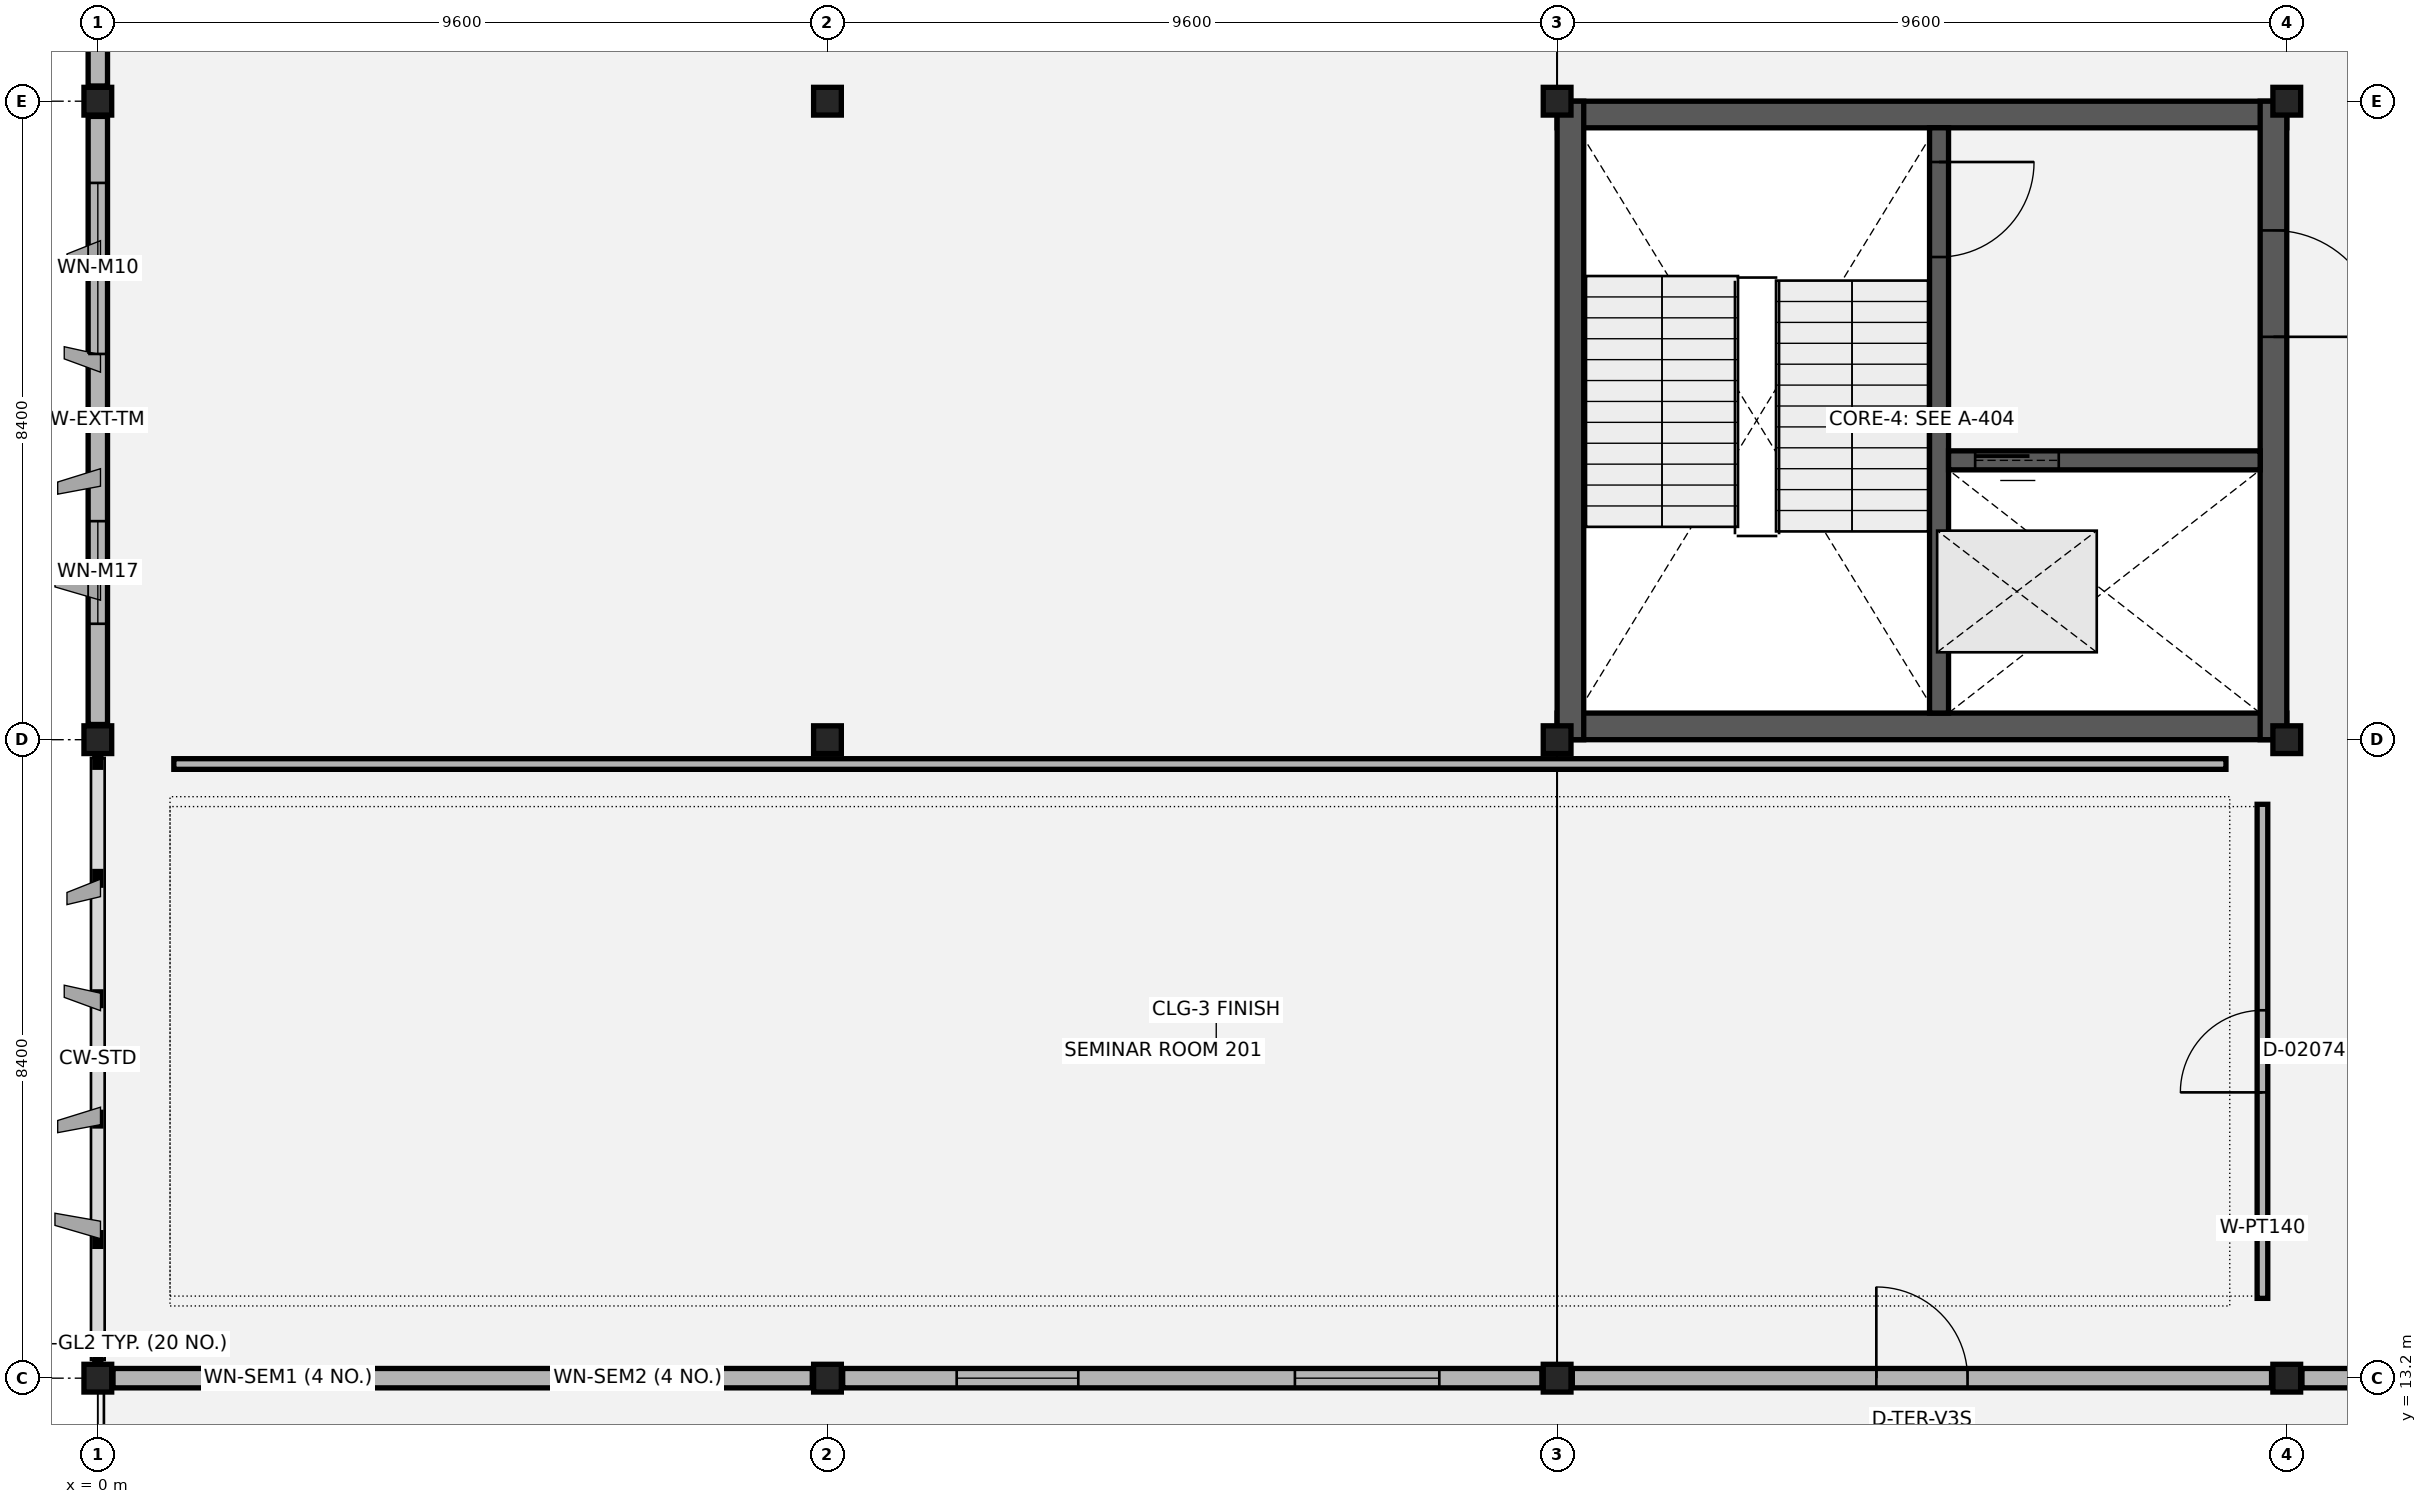
"""IFC4 building model, lengths in metres.
Left out: names, types, materials, properties, quantities, classifications, styles, units other than length and angle.
Written with IfcOpenShell. Run it as: python <this file> out.ifc"""

import sys

from ifc_helpers import new_model, si_unit, direction, frame, frame_2d, origin, origin_2d, place, context, subcontext, project, spatial, rectangle, extrude, element, fill, save


model = new_model("IFC4")
c1 = context("Model", 3, precision=1e-05, world=origin(), true_north=direction((0.0, 1.0)))
c2 = subcontext(c1, "Body", "Model", "MODEL_VIEW")
j1 = project(units=[si_unit("LENGTHUNIT", "METRE"), si_unit("PLANEANGLEUNIT", "RADIAN")], contexts=[c1])
p1 = place(None, origin())
s1 = spatial("IfcSite", under=j1, at=p1, CompositionType="ELEMENT")
p2 = place(p1, origin())
s2 = spatial("IfcBuilding", under=s1, at=p2, CompositionType="ELEMENT")
p3 = place(p2, frame((0.0, 0.0, 10.2)))
s3 = spatial("IfcBuildingStorey", under=s2, at=p3, CompositionType="ELEMENT", Elevation=10.2)
for number, where, z_axis, x_axis in (
    (1, (0.0, 13.2, 0.0), (0.0, 0.0, 1.0), (1.0, 0.0, 0.0)),
    (2, (0.0, 21.6, 0.0), (0.0, 0.0, 1.0), (1.0, 0.0, 0.0)),
    (3, (0.0, 30.0, 0.0), (0.0, 0.0, 1.0), (1.0, 0.0, 0.0)),
    (4, (9.6, 13.2, 0.0), (0.0, 0.0, 1.0), (1.0, 0.0, 0.0)),
    (5, (9.6, 21.6, 0.0), (0.0, 0.0, 1.0), (1.0, 0.0, 0.0)),
    (6, (9.6, 30.0, 0.0), (0.0, 0.0, 1.0), (1.0, 0.0, 0.0)),
    (7, (19.2, 13.2, 0.0), (0.0, 0.0, 1.0), (1.0, 0.0, 0.0)),
    (8, (19.2, 21.6, 0.0), (0.0, 0.0, 1.0), (1.0, 0.0, 0.0)),
    (9, (19.2, 30.0, 0.0), (0.0, 0.0, 1.0), (1.0, 0.0, 0.0)),
    (10, (28.8, 13.2, 0.0), (0.0, 0.0, 1.0), (1.0, 0.0, 0.0)),
    (11, (28.8, 21.6, 0.0), (0.0, 0.0, 1.0), (1.0, 0.0, 0.0)),
    (12, (28.8, 30.0, 0.0), (0.0, 0.0, 1.0), (1.0, 0.0, 0.0)),
):
    element("IfcColumn", number, at=place(p3, frame(where, z_axis=z_axis, x_axis=x_axis)), inside=s3, PredefinedType="COLUMN", context=c2, shape_type="SweptSolid", body=[
        extrude(rectangle(XDim=0.365, YDim=0.365, at=origin_2d()), origin(), (0.0, 0.0, 1.0), 4.2),
    ])
p4 = place(p3, frame((0.0, 29.8, 0.0), z_axis=(0.0, 0.0, 1.0), x_axis=(0.0, -1.0, 0.0)))
e13 = element("IfcWall", 13, at=p4, inside=s3, PredefinedType="SOLIDWALL", context=c2, shape_type="SweptSolid", body=[
    extrude(rectangle(XDim=8.0, YDim=0.255, at=frame_2d((4.0, 0.0))), origin(), (0.0, 0.0, 1.0), 3.05),
])
p5 = place(p4, frame((0.875, 0.0, 0.9)))
e14 = element("IfcOpeningElement", 14, at=p5, cuts=e13, PredefinedType="OPENING", context=c2, shape_type="SweptSolid", body=[
    extrude(rectangle(XDim=2.25, YDim=1.65, at=frame_2d((1.125, 0.825))), frame((0.0, 0.137, 0.0), z_axis=(0.0, -1.0, 0.0), x_axis=(1.0, 0.0, 0.0)), (0.0, 0.0, 1.0), 0.275),
])
p6 = place(p4, frame((5.325, 0.0, 0.9)))
e15 = element("IfcOpeningElement", 15, at=p6, cuts=e13, PredefinedType="OPENING", context=c2, shape_type="SweptSolid", body=[
    extrude(rectangle(XDim=1.35, YDim=1.35, at=frame_2d((0.675, 0.675))), frame((0.0, 0.137, 0.0), z_axis=(0.0, -1.0, 0.0), x_axis=(1.0, 0.0, 0.0)), (0.0, 0.0, 1.0), 0.275),
])
p7 = place(p3, frame((0.0, 38.2, 0.0), z_axis=(0.0, 0.0, 1.0), x_axis=(0.0, -1.0, 0.0)))
e16 = element("IfcWall", 16, at=p7, inside=s3, PredefinedType="SOLIDWALL", context=c2, shape_type="SweptSolid", body=[
    extrude(rectangle(XDim=8.0, YDim=0.255, at=frame_2d((4.0, 0.0))), origin(), (0.0, 0.0, 1.0), 3.05),
])
p8 = place(p7, frame((0.725, 0.0, 0.9)))
e17 = element("IfcOpeningElement", 17, at=p8, cuts=e16, PredefinedType="OPENING", context=c2, shape_type="SweptSolid", body=[
    extrude(rectangle(XDim=2.55, YDim=1.75, at=frame_2d((1.275, 0.875))), frame((0.0, 0.137, 0.0), z_axis=(0.0, -1.0, 0.0), x_axis=(1.0, 0.0, 0.0)), (0.0, 0.0, 1.0), 0.275),
])
p9 = place(p7, frame((5.0, 0.0, 0.9)))
e18 = element("IfcOpeningElement", 18, at=p9, cuts=e16, PredefinedType="OPENING", context=c2, shape_type="SweptSolid", body=[
    extrude(rectangle(XDim=2.0, YDim=1.55, at=frame_2d((1.0, 0.775))), frame((0.0, 0.137, 0.0), z_axis=(0.0, -1.0, 0.0), x_axis=(1.0, 0.0, 0.0)), (0.0, 0.0, 1.0), 0.275),
])
p10 = place(p3, frame((0.2, 13.2, 0.0), z_axis=(0.0, 0.0, 1.0), x_axis=(1.0, 0.0, 0.0)))
e19 = element("IfcWall", 19, at=p10, inside=s3, PredefinedType="SOLIDWALL", context=c2, shape_type="SweptSolid", body=[
    extrude(rectangle(XDim=9.2, YDim=0.255, at=frame_2d((4.6, 0.0))), origin(), (0.0, 0.0, 1.0), 3.05),
])
p11 = place(p10, frame((1.5, 0.0, 0.9)))
e20 = element("IfcOpeningElement", 20, at=p11, cuts=e19, PredefinedType="OPENING", context=c2, shape_type="SweptSolid", body=[
    extrude(rectangle(XDim=1.6, YDim=1.45, at=frame_2d((0.8, 0.725))), frame((0.0, 0.137, 0.0), z_axis=(0.0, -1.0, 0.0), x_axis=(1.0, 0.0, 0.0)), (0.0, 0.0, 1.0), 0.275),
])
p12 = place(p10, frame((5.95, 0.0, 0.9)))
e21 = element("IfcOpeningElement", 21, at=p12, cuts=e19, PredefinedType="OPENING", context=c2, shape_type="SweptSolid", body=[
    extrude(rectangle(XDim=1.9, YDim=1.45, at=frame_2d((0.95, 0.725))), frame((0.0, 0.137, 0.0), z_axis=(0.0, -1.0, 0.0), x_axis=(1.0, 0.0, 0.0)), (0.0, 0.0, 1.0), 0.275),
])
p13 = place(p3, frame((9.8, 13.2, 0.0), z_axis=(0.0, 0.0, 1.0), x_axis=(1.0, 0.0, 0.0)))
e22 = element("IfcWall", 22, at=p13, inside=s3, PredefinedType="SOLIDWALL", context=c2, shape_type="SweptSolid", body=[
    extrude(rectangle(XDim=9.2, YDim=0.255, at=frame_2d((4.6, 0.0))), origin(), (0.0, 0.0, 1.0), 3.05),
])
p14 = place(p13, frame((1.5, 0.0, 0.9)))
e23 = element("IfcOpeningElement", 23, at=p14, cuts=e22, PredefinedType="OPENING", context=c2, shape_type="SweptSolid", body=[
    extrude(rectangle(XDim=1.6, YDim=1.45, at=frame_2d((0.8, 0.725))), frame((0.0, 0.137, 0.0), z_axis=(0.0, -1.0, 0.0), x_axis=(1.0, 0.0, 0.0)), (0.0, 0.0, 1.0), 0.275),
])
p15 = place(p13, frame((5.95, 0.0, 0.9)))
e24 = element("IfcOpeningElement", 24, at=p15, cuts=e22, PredefinedType="OPENING", context=c2, shape_type="SweptSolid", body=[
    extrude(rectangle(XDim=1.9, YDim=1.45, at=frame_2d((0.95, 0.725))), frame((0.0, 0.137, 0.0), z_axis=(0.0, -1.0, 0.0), x_axis=(1.0, 0.0, 0.0)), (0.0, 0.0, 1.0), 0.275),
])
p16 = place(p3, frame((19.4, 13.2, 0.0), z_axis=(0.0, 0.0, 1.0), x_axis=(1.0, 0.0, 0.0)))
e25 = element("IfcWall", 25, at=p16, inside=s3, PredefinedType="SOLIDWALL", context=c2, shape_type="SweptSolid", body=[
    extrude(rectangle(XDim=9.2, YDim=0.255, at=frame_2d((4.6, 0.0))), origin(), (0.0, 0.0, 1.0), 3.05),
])
p17 = place(p16, frame((4.0, 0.0, 0.0)))
e26 = element("IfcOpeningElement", 26, at=p17, cuts=e25, PredefinedType="OPENING", context=c2, shape_type="SweptSolid", body=[
    extrude(rectangle(XDim=1.2, YDim=2.15, at=frame_2d((0.6, 1.075))), frame((0.0, 0.137, 0.0), z_axis=(0.0, -1.0, 0.0), x_axis=(1.0, 0.0, 0.0)), (0.0, 0.0, 1.0), 0.275),
])
p18 = place(p3, frame((29.0, 13.2, 0.0), z_axis=(0.0, 0.0, 1.0), x_axis=(1.0, 0.0, 0.0)))
e27 = element("IfcWall", 27, at=p18, inside=s3, PredefinedType="SOLIDWALL", context=c2, shape_type="SweptSolid", body=[
    extrude(rectangle(XDim=9.2, YDim=0.255, at=frame_2d((4.6, 0.0))), origin(), (0.0, 0.0, 1.0), 3.05),
])
p19 = place(p18, frame((1.5, 0.0, 0.9)))
e28 = element("IfcOpeningElement", 28, at=p19, cuts=e27, PredefinedType="OPENING", context=c2, shape_type="SweptSolid", body=[
    extrude(rectangle(XDim=1.6, YDim=1.45, at=frame_2d((0.8, 0.725))), frame((0.0, 0.137, 0.0), z_axis=(0.0, -1.0, 0.0), x_axis=(1.0, 0.0, 0.0)), (0.0, 0.0, 1.0), 0.275),
])
p20 = place(p18, frame((5.95, 0.0, 0.9)))
e29 = element("IfcOpeningElement", 29, at=p20, cuts=e27, PredefinedType="OPENING", context=c2, shape_type="SweptSolid", body=[
    extrude(rectangle(XDim=1.9, YDim=1.45, at=frame_2d((0.95, 0.725))), frame((0.0, 0.137, 0.0), z_axis=(0.0, -1.0, 0.0), x_axis=(1.0, 0.0, 0.0)), (0.0, 0.0, 1.0), 0.275),
])
for number, where, z_axis, x_axis in (
    (30, (19.2, 29.825, 0.0), (0.0, 0.0, 1.0), (1.0, 0.0, 0.0)),
    (31, (19.2, 21.775, 0.0), (0.0, 0.0, 1.0), (1.0, 0.0, 0.0)),
):
    element("IfcWall", number, at=place(p3, frame(where, z_axis=z_axis, x_axis=x_axis)), inside=s3, PredefinedType="SHEAR", context=c2, shape_type="SweptSolid", body=[
        extrude(rectangle(XDim=9.6, YDim=0.35, at=frame_2d((4.8, 0.0))), origin(), (0.0, 0.0, 1.0), 3.95),
    ])
p21 = place(p3, frame((19.375, 21.6, 0.0), z_axis=(0.0, 0.0, 1.0), x_axis=(0.0, 1.0, 0.0)))
e32 = element("IfcWall", 32, at=p21, inside=s3, PredefinedType="SHEAR", context=c2, shape_type="SweptSolid", body=[
    extrude(rectangle(XDim=8.4, YDim=0.35, at=frame_2d((4.2, 0.0))), origin(), (0.0, 0.0, 1.0), 3.95),
])
p22 = place(p3, frame((28.625, 21.6, 0.0), z_axis=(0.0, 0.0, 1.0), x_axis=(0.0, 1.0, 0.0)))
e33 = element("IfcWall", 33, at=p22, inside=s3, PredefinedType="SHEAR", context=c2, shape_type="SweptSolid", body=[
    extrude(rectangle(XDim=8.4, YDim=0.35, at=frame_2d((4.2, 0.0))), origin(), (0.0, 0.0, 1.0), 3.95),
])
p23 = place(p22, frame((5.3, 0.0, 0.0)))
e34 = element("IfcOpeningElement", 34, at=p23, cuts=e33, PredefinedType="OPENING", context=c2, shape_type="SweptSolid", body=[
    extrude(rectangle(XDim=1.4, YDim=2.15, at=frame_2d((0.7, 1.075))), frame((0.0, 0.185, 0.0), z_axis=(0.0, -1.0, 0.0), x_axis=(1.0, 0.0, 0.0)), (0.0, 0.0, 1.0), 0.37),
])
p24 = place(p3, frame((24.225, 29.65, 0.0), z_axis=(0.0, 0.0, 1.0), x_axis=(0.0, -1.0, 0.0)))
e35 = element("IfcWall", 35, at=p24, inside=s3, PredefinedType="SHEAR", context=c2, shape_type="SweptSolid", body=[
    extrude(rectangle(XDim=7.7, YDim=0.25, at=frame_2d((3.85, 0.0))), origin(), (0.0, 0.0, 1.0), 3.95),
])
p25 = place(p24, frame((0.45, 0.0, 0.0)))
e36 = element("IfcOpeningElement", 36, at=p25, cuts=e35, PredefinedType="OPENING", context=c2, shape_type="SweptSolid", body=[
    extrude(rectangle(XDim=1.25, YDim=2.15, at=frame_2d((0.625, 1.075))), frame((0.0, 0.135, 0.0), z_axis=(0.0, -1.0, 0.0), x_axis=(1.0, 0.0, 0.0)), (0.0, 0.0, 1.0), 0.27),
])
p26 = place(p3, frame((24.35, 25.275, 0.0), z_axis=(0.0, 0.0, 1.0), x_axis=(1.0, 0.0, 0.0)))
e37 = element("IfcWall", 37, at=p26, inside=s3, PredefinedType="SHEAR", context=c2, shape_type="SweptSolid", body=[
    extrude(rectangle(XDim=4.1, YDim=0.25, at=frame_2d((2.05, 0.0))), origin(), (0.0, 0.0, 1.0), 3.95),
])
p27 = place(p26, frame((0.35, 0.0, 0.0)))
e38 = element("IfcOpeningElement", 38, at=p27, cuts=e37, PredefinedType="OPENING", context=c2, shape_type="SweptSolid", body=[
    extrude(rectangle(XDim=1.1, YDim=2.15, at=frame_2d((0.55, 1.075))), frame((0.0, 0.135, 0.0), z_axis=(0.0, -1.0, 0.0), x_axis=(1.0, 0.0, 0.0)), (0.0, 0.0, 1.0), 0.27),
])
p28 = place(p3, frame((28.48, 14.25, 0.0), z_axis=(0.0, 0.0, 1.0), x_axis=(0.0, 1.0, 0.0)))
e39 = element("IfcWall", 39, at=p28, inside=s3, PredefinedType="PARTITIONING", context=c2, shape_type="SweptSolid", body=[
    extrude(rectangle(XDim=6.5, YDim=0.14, at=frame_2d((3.25, 0.0))), origin(), (0.0, 0.0, 1.0), 3.03),
])
p29 = place(p28, frame((2.71, 0.0, 0.0)))
e40 = element("IfcOpeningElement", 40, at=p29, cuts=e39, PredefinedType="OPENING", context=c2, shape_type="SweptSolid", body=[
    extrude(rectangle(XDim=1.08, YDim=2.15, at=frame_2d((0.54, 1.075))), frame((0.0, 0.08, 0.0), z_axis=(0.0, -1.0, 0.0), x_axis=(1.0, 0.0, 0.0)), (0.0, 0.0, 1.0), 0.16),
])
p30 = place(p3, frame((1.0, 21.28, 0.0), z_axis=(0.0, 0.0, 1.0), x_axis=(1.0, 0.0, 0.0)))
e41 = element("IfcWall", 41, at=p30, inside=s3, PredefinedType="PARTITIONING", context=c2, shape_type="SweptSolid", body=[
    extrude(rectangle(XDim=27.0, YDim=0.14, at=frame_2d((13.5, 0.0))), origin(), (0.0, 0.0, 1.0), 3.03),
])
p31 = place(p5, origin())
e42 = element("IfcWindow", 42, at=p31, inside=s3, PartitioningType="SINGLE_PANEL", PredefinedType="WINDOW", context=c2, shape_type="SweptSolid", body=[
    extrude(rectangle(XDim=2.25, YDim=1.65, at=frame_2d((1.125, 0.825))), frame((0.0, 0.03, 0.0), z_axis=(0.0, -1.0, 0.0), x_axis=(1.0, 0.0, 0.0)), (0.0, 0.0, 1.0), 0.06),
])
fill(e14, e42)
p32 = place(p6, origin())
e43 = element("IfcWindow", 43, at=p32, inside=s3, PartitioningType="SINGLE_PANEL", PredefinedType="WINDOW", context=c2, shape_type="SweptSolid", body=[
    extrude(rectangle(XDim=1.35, YDim=1.35, at=frame_2d((0.675, 0.675))), frame((0.0, 0.03, 0.0), z_axis=(0.0, -1.0, 0.0), x_axis=(1.0, 0.0, 0.0)), (0.0, 0.0, 1.0), 0.06),
])
fill(e15, e43)
p33 = place(p11, origin())
e44 = element("IfcWindow", 44, at=p33, inside=s3, PartitioningType="SINGLE_PANEL", PredefinedType="WINDOW", context=c2, shape_type="SweptSolid", body=[
    extrude(rectangle(XDim=1.6, YDim=1.45, at=frame_2d((0.8, 0.725))), frame((0.0, 0.03, 0.0), z_axis=(0.0, -1.0, 0.0), x_axis=(1.0, 0.0, 0.0)), (0.0, 0.0, 1.0), 0.06),
])
fill(e20, e44)
p34 = place(p12, origin())
e45 = element("IfcWindow", 45, at=p34, inside=s3, PartitioningType="SINGLE_PANEL", PredefinedType="WINDOW", context=c2, shape_type="SweptSolid", body=[
    extrude(rectangle(XDim=1.9, YDim=1.45, at=frame_2d((0.95, 0.725))), frame((0.0, 0.03, 0.0), z_axis=(0.0, -1.0, 0.0), x_axis=(1.0, 0.0, 0.0)), (0.0, 0.0, 1.0), 0.06),
])
fill(e21, e45)
p35 = place(p14, origin())
e46 = element("IfcWindow", 46, at=p35, inside=s3, PartitioningType="SINGLE_PANEL", PredefinedType="WINDOW", context=c2, shape_type="SweptSolid", body=[
    extrude(rectangle(XDim=1.6, YDim=1.45, at=frame_2d((0.8, 0.725))), frame((0.0, 0.03, 0.0), z_axis=(0.0, -1.0, 0.0), x_axis=(1.0, 0.0, 0.0)), (0.0, 0.0, 1.0), 0.06),
])
fill(e23, e46)
p36 = place(p15, origin())
e47 = element("IfcWindow", 47, at=p36, inside=s3, PartitioningType="SINGLE_PANEL", PredefinedType="WINDOW", context=c2, shape_type="SweptSolid", body=[
    extrude(rectangle(XDim=1.9, YDim=1.45, at=frame_2d((0.95, 0.725))), frame((0.0, 0.03, 0.0), z_axis=(0.0, -1.0, 0.0), x_axis=(1.0, 0.0, 0.0)), (0.0, 0.0, 1.0), 0.06),
])
fill(e24, e47)
p37 = place(p17, origin())
e48 = element("IfcDoor", 48, at=p37, inside=s3, OperationType="SINGLE_SWING_LEFT", PredefinedType="DOOR", context=c2, shape_type="SweptSolid", body=[
    extrude(rectangle(XDim=1.2, YDim=2.15, at=frame_2d((0.6, 1.075))), frame((0.0, 0.025, 0.0), z_axis=(0.0, -1.0, 0.0), x_axis=(1.0, 0.0, 0.0)), (0.0, 0.0, 1.0), 0.05),
])
fill(e26, e48)
p38 = place(p25, origin())
e49 = element("IfcDoor", 49, at=p38, inside=s3, OperationType="SINGLE_SWING_LEFT", PredefinedType="DOOR", context=c2, shape_type="SweptSolid", body=[
    extrude(rectangle(XDim=1.25, YDim=2.15, at=frame_2d((0.625, 1.075))), frame((0.0, 0.025, 0.0), z_axis=(0.0, -1.0, 0.0), x_axis=(1.0, 0.0, 0.0)), (0.0, 0.0, 1.0), 0.05),
])
fill(e36, e49)
p39 = place(p27, origin())
e50 = element("IfcDoor", 50, at=p39, inside=s3, OperationType="SLIDING_TO_LEFT", PredefinedType="DOOR", context=c2, shape_type="SweptSolid", body=[
    extrude(rectangle(XDim=1.1, YDim=2.15, at=frame_2d((0.55, 1.075))), frame((0.0, 0.025, 0.0), z_axis=(0.0, -1.0, 0.0), x_axis=(1.0, 0.0, 0.0)), (0.0, 0.0, 1.0), 0.05),
])
fill(e38, e50)
p40 = place(p23, origin())
e51 = element("IfcDoor", 51, at=p40, inside=s3, OperationType="SINGLE_SWING_RIGHT", PredefinedType="DOOR", context=c2, shape_type="SweptSolid", body=[
    extrude(rectangle(XDim=1.4, YDim=2.15, at=frame_2d((0.7, 1.075))), frame((0.0, 0.025, 0.0), z_axis=(0.0, -1.0, 0.0), x_axis=(1.0, 0.0, 0.0)), (0.0, 0.0, 1.0), 0.05),
])
fill(e34, e51)
p41 = place(p29, origin())
e52 = element("IfcDoor", 52, at=p41, inside=s3, OperationType="SINGLE_SWING_LEFT", PredefinedType="DOOR", context=c2, shape_type="SweptSolid", body=[
    extrude(rectangle(XDim=1.08, YDim=2.15, at=frame_2d((0.54, 1.075))), frame((0.0, 0.025, 0.0), z_axis=(0.0, -1.0, 0.0), x_axis=(1.0, 0.0, 0.0)), (0.0, 0.0, 1.0), 0.05),
])
fill(e40, e52)
save(model, sys.argv[1])
